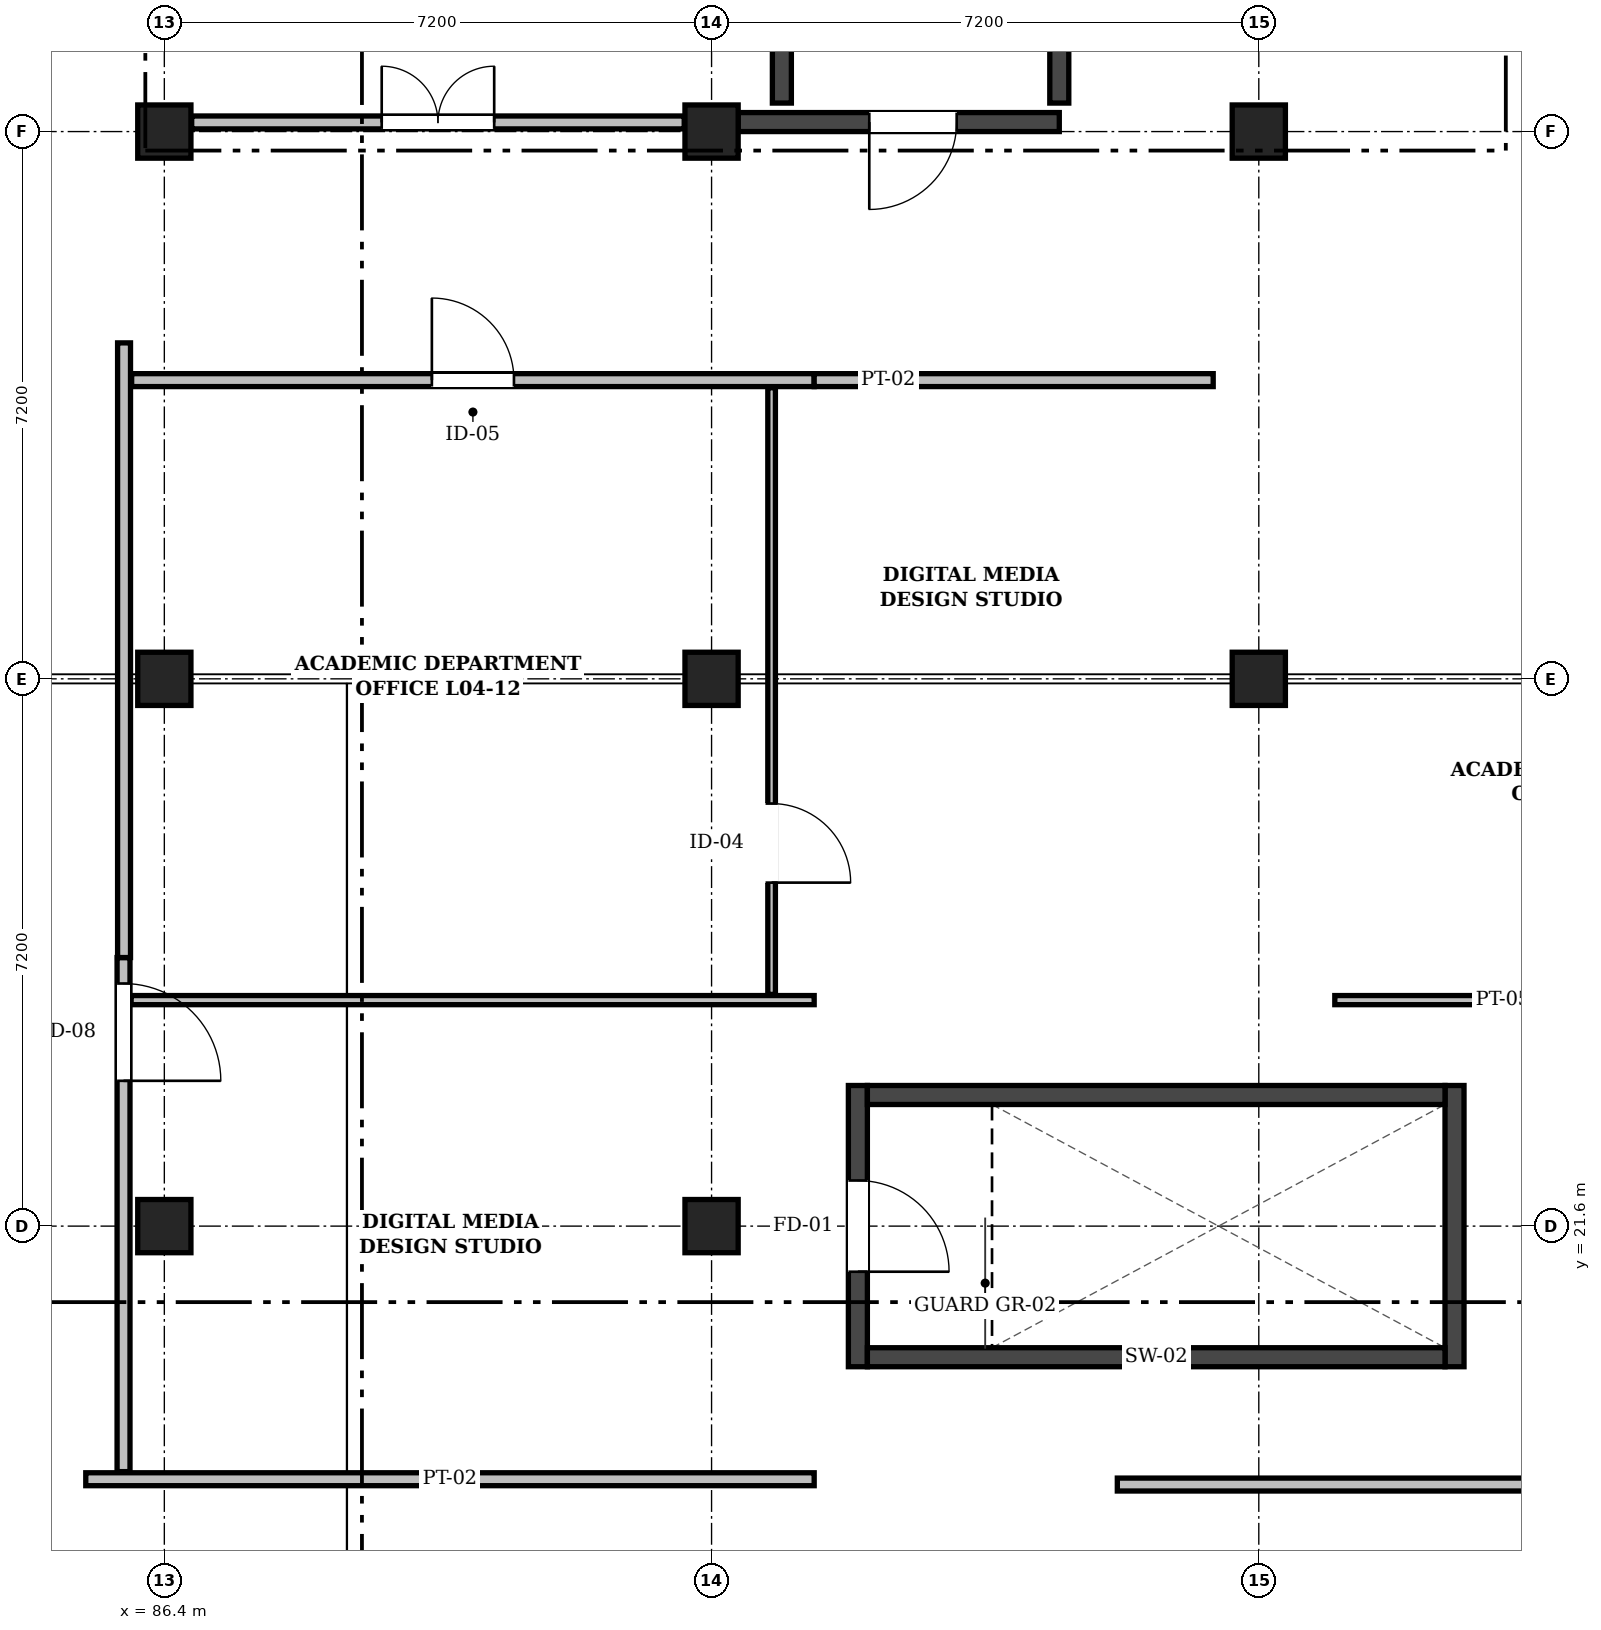
"""IFC4 building model, lengths in metres.
Left out: names, types, materials, properties, quantities, classifications, styles, units other than length and angle.
Written with IfcOpenShell. Run it as: python <this file> out.ifc"""

import sys

from ifc_helpers import new_model, si_unit, direction, frame, frame_2d, origin, origin_2d, place, context, subcontext, project, spatial, rectangle, extrude, element, fill, save


model = new_model("IFC4")
c1 = context("Model", 3, precision=1e-05, world=origin(), true_north=direction((0.0, 1.0)))
c2 = subcontext(c1, "Body", "Model", "MODEL_VIEW")
j1 = project(units=[si_unit("LENGTHUNIT", "METRE"), si_unit("PLANEANGLEUNIT", "RADIAN")], contexts=[c1])
p1 = place(None, origin())
s1 = spatial("IfcSite", under=j1, at=p1, CompositionType="ELEMENT")
p2 = place(p1, origin())
s2 = spatial("IfcBuilding", under=s1, at=p2, CompositionType="ELEMENT")
p3 = place(p2, frame((0.0, 0.0, 18.9)))
s3 = spatial("IfcBuildingStorey", under=s2, at=p3, CompositionType="ELEMENT", Elevation=18.9)
for number, where, z_axis, x_axis in (
    (1, (86.4, 21.6, 0.0), (0.0, 0.0, 1.0), (1.0, 0.0, 0.0)),
    (2, (86.4, 28.8, 0.0), (0.0, 0.0, 1.0), (1.0, 0.0, 0.0)),
    (3, (86.4, 36.0, 0.0), (0.0, 0.0, 1.0), (1.0, 0.0, 0.0)),
    (4, (93.6, 21.6, 0.0), (0.0, 0.0, 1.0), (1.0, 0.0, 0.0)),
    (5, (93.6, 28.8, 0.0), (0.0, 0.0, 1.0), (1.0, 0.0, 0.0)),
    (6, (93.6, 36.0, 0.0), (0.0, 0.0, 1.0), (1.0, 0.0, 0.0)),
    (7, (100.8, 28.8, 0.0), (0.0, 0.0, 1.0), (1.0, 0.0, 0.0)),
    (8, (100.8, 36.0, 0.0), (0.0, 0.0, 1.0), (1.0, 0.0, 0.0)),
):
    element("IfcColumn", number, at=place(p3, frame(where, z_axis=z_axis, x_axis=x_axis)), inside=s3, PredefinedType="COLUMN", context=c2, shape_type="SweptSolid", body=[
        extrude(rectangle(XDim=0.7, YDim=0.7, at=origin_2d()), origin(), (0.0, 0.0, 1.0), 4.5),
    ])
p4 = place(p3, frame((95.525, 19.75, 0.0), z_axis=(0.0, 0.0, 1.0), x_axis=(0.0, 1.0, 0.0)))
e9 = element("IfcWall", 9, at=p4, inside=s3, PredefinedType="SHEAR", context=c2, shape_type="SweptSolid", body=[
    extrude(rectangle(XDim=3.7, YDim=0.25, at=frame_2d((1.85, 0.0))), origin(), (0.0, 0.0, 1.0), 4.25),
])
p5 = place(p4, frame((1.25, 0.0, 0.0)))
e10 = element("IfcOpeningElement", 10, at=p5, cuts=e9, PredefinedType="OPENING", context=c2, shape_type="SweptSolid", body=[
    extrude(rectangle(XDim=1.2, YDim=2.15, at=frame_2d((0.6, 1.075))), frame((0.0, 0.137, 0.0), z_axis=(0.0, -1.0, 0.0), x_axis=(1.0, 0.0, 0.0)), (0.0, 0.0, 1.0), 0.274),
])
p6 = place(p3, frame((103.375, 19.75, 0.0), z_axis=(0.0, 0.0, 1.0), x_axis=(0.0, 1.0, 0.0)))
e11 = element("IfcWall", 11, at=p6, inside=s3, PredefinedType="SHEAR", context=c2, shape_type="SweptSolid", body=[
    extrude(rectangle(XDim=3.7, YDim=0.25, at=frame_2d((1.85, 0.0))), origin(), (0.0, 0.0, 1.0), 4.25),
])
for number, where, z_axis, x_axis in (
    (12, (95.65, 19.875, 0.0), (0.0, 0.0, 1.0), (1.0, 0.0, 0.0)),
    (13, (95.65, 23.325, 0.0), (0.0, 0.0, 1.0), (1.0, 0.0, 0.0)),
):
    element("IfcWall", number, at=place(p3, frame(where, z_axis=z_axis, x_axis=x_axis)), inside=s3, PredefinedType="SHEAR", context=c2, shape_type="SweptSolid", body=[
        extrude(rectangle(XDim=7.6, YDim=0.25, at=frame_2d((3.8, 0.0))), origin(), (0.0, 0.0, 1.0), 4.25),
    ])
p7 = place(p3, frame((93.95, 36.125, 0.0), z_axis=(0.0, 0.0, 1.0), x_axis=(1.0, 0.0, 0.0)))
e14 = element("IfcWall", 14, at=p7, inside=s3, PredefinedType="SHEAR", context=c2, shape_type="SweptSolid", body=[
    extrude(rectangle(XDim=4.225, YDim=0.25, at=frame_2d((2.113, 0.0))), origin(), (0.0, 0.0, 1.0), 4.25),
])
p8 = place(p7, frame((1.725, 0.0, 0.0)))
e15 = element("IfcOpeningElement", 15, at=p8, cuts=e14, PredefinedType="OPENING", context=c2, shape_type="SweptSolid", body=[
    extrude(rectangle(XDim=1.15, YDim=2.15, at=frame_2d((0.575, 1.075))), frame((0.0, 0.137, 0.0), z_axis=(0.0, -1.0, 0.0), x_axis=(1.0, 0.0, 0.0)), (0.0, 0.0, 1.0), 0.274),
])
p9 = place(p3, frame((94.525, 36.375, 0.0), z_axis=(0.0, 0.0, 1.0), x_axis=(0.0, 1.0, 0.0)))
e16 = element("IfcWall", 16, at=p9, inside=s3, PredefinedType="SHEAR", context=c2, shape_type="SweptSolid", body=[
    extrude(rectangle(XDim=2.77, YDim=0.25, at=frame_2d((1.385, 0.0))), origin(), (0.0, 0.0, 1.0), 4.25),
])
p10 = place(p3, frame((98.175, 36.375, 0.0), z_axis=(0.0, 0.0, 1.0), x_axis=(0.0, 1.0, 0.0)))
e17 = element("IfcWall", 17, at=p10, inside=s3, PredefinedType="SHEAR", context=c2, shape_type="SweptSolid", body=[
    extrude(rectangle(XDim=3.225, YDim=0.25, at=frame_2d((1.613, 0.0))), origin(), (0.0, 0.0, 1.0), 4.25),
])
p11 = place(p3, frame((85.366, 18.27, 0.0), z_axis=(0.0, 0.0, 1.0), x_axis=(1.0, 0.0, 0.0)))
e18 = element("IfcWall", 18, at=p11, inside=s3, PredefinedType="PARTITIONING", context=c2, shape_type="SweptSolid", body=[
    extrude(rectangle(XDim=9.583, YDim=0.17, at=frame_2d((4.792, 0.0))), origin(), (0.0, 0.0, 1.0), 4.16),
])
p12 = place(p3, frame((98.938, 18.2, 0.0), z_axis=(0.0, 0.0, 1.0), x_axis=(1.0, 0.0, 0.0)))
e19 = element("IfcWall", 19, at=p12, inside=s3, PredefinedType="PARTITIONING", context=c2, shape_type="SweptSolid", body=[
    extrude(rectangle(XDim=12.51, YDim=0.17, at=frame_2d((6.255, 0.0))), origin(), (0.0, 0.0, 1.0), 4.16),
])
p13 = place(p3, frame((85.863, 18.37, 0.0), z_axis=(0.0, 0.0, 1.0), x_axis=(0.0, 1.0, 0.0)))
e20 = element("IfcWall", 20, at=p13, inside=s3, PredefinedType="PARTITIONING", context=c2, shape_type="SweptSolid", body=[
    extrude(rectangle(XDim=6.763, YDim=0.17, at=frame_2d((3.382, 0.0))), origin(), (0.0, 0.0, 1.0), 4.16),
])
p14 = place(p13, frame((5.142, 0.0, 0.0)))
e21 = element("IfcOpeningElement", 21, at=p14, cuts=e20, PredefinedType="OPENING", context=c2, shape_type="SweptSolid", body=[
    extrude(rectangle(XDim=1.28, YDim=2.22, at=frame_2d((0.64, 1.11))), frame((0.0, 0.097, 0.0), z_axis=(0.0, -1.0, 0.0), x_axis=(1.0, 0.0, 0.0)), (0.0, 0.0, 1.0), 0.194),
])
p15 = place(p3, frame((85.87, 25.133, 0.0), z_axis=(0.0, 0.0, 1.0), x_axis=(0.0, 1.0, 0.0)))
e22 = element("IfcWall", 22, at=p15, inside=s3, PredefinedType="PARTITIONING", context=c2, shape_type="SweptSolid", body=[
    extrude(rectangle(XDim=8.087, YDim=0.17, at=frame_2d((4.043, 0.0))), origin(), (0.0, 0.0, 1.0), 4.16),
])
p16 = place(p3, frame((86.76, 36.12, 0.0), z_axis=(0.0, 0.0, 1.0), x_axis=(1.0, 0.0, 0.0)))
e23 = element("IfcWall", 23, at=p16, inside=s3, PredefinedType="PARTITIONING", context=c2, shape_type="SweptSolid", body=[
    extrude(rectangle(XDim=6.48, YDim=0.17, at=frame_2d((3.24, 0.0))), origin(), (0.0, 0.0, 1.0), 3.73),
])
p17 = place(p16, frame((2.5, 0.0, 0.0)))
e24 = element("IfcOpeningElement", 24, at=p17, cuts=e23, PredefinedType="OPENING", context=c2, shape_type="SweptSolid", body=[
    extrude(rectangle(XDim=1.48, YDim=2.26, at=frame_2d((0.74, 1.13))), frame((0.0, 0.097, 0.0), z_axis=(0.0, -1.0, 0.0), x_axis=(1.0, 0.0, 0.0)), (0.0, 0.0, 1.0), 0.194),
])
p18 = place(p3, frame((85.97, 32.73, 0.0), z_axis=(0.0, 0.0, 1.0), x_axis=(1.0, 0.0, 0.0)))
e25 = element("IfcWall", 25, at=p18, inside=s3, PredefinedType="PARTITIONING", context=c2, shape_type="SweptSolid", body=[
    extrude(rectangle(XDim=8.98, YDim=0.17, at=frame_2d((4.49, 0.0))), origin(), (0.0, 0.0, 1.0), 4.16),
])
p19 = place(p18, frame((3.95, 0.0, 0.0)))
e26 = element("IfcOpeningElement", 26, at=p19, cuts=e25, PredefinedType="OPENING", context=c2, shape_type="SweptSolid", body=[
    extrude(rectangle(XDim=1.08, YDim=2.2, at=frame_2d((0.54, 1.1))), frame((0.0, 0.097, 0.0), z_axis=(0.0, -1.0, 0.0), x_axis=(1.0, 0.0, 0.0)), (0.0, 0.0, 1.0), 0.194),
])
p20 = place(p3, frame((94.95, 32.73, 0.0), z_axis=(0.0, 0.0, 1.0), x_axis=(1.0, 0.0, 0.0)))
e27 = element("IfcWall", 27, at=p20, inside=s3, PredefinedType="PARTITIONING", context=c2, shape_type="SweptSolid", body=[
    extrude(rectangle(XDim=5.25, YDim=0.17, at=frame_2d((2.625, 0.0))), origin(), (0.0, 0.0, 1.0), 4.16),
])
p21 = place(p3, frame((85.963, 24.573, 0.0), z_axis=(0.0, 0.0, 1.0), x_axis=(1.0, 0.0, 0.0)))
e28 = element("IfcWall", 28, at=p21, inside=s3, PredefinedType="PARTITIONING", context=c2, shape_type="SweptSolid", body=[
    extrude(rectangle(XDim=8.987, YDim=0.12, at=frame_2d((4.493, 0.0))), origin(), (0.0, 0.0, 1.0), 4.16),
])
p22 = place(p3, frame((94.39, 24.648, 0.0), z_axis=(0.0, 0.0, 1.0), x_axis=(0.0, 1.0, 0.0)))
e29 = element("IfcWall", 29, at=p22, inside=s3, PredefinedType="PARTITIONING", context=c2, shape_type="SweptSolid", body=[
    extrude(rectangle(XDim=7.982, YDim=0.1, at=frame_2d((3.991, 0.0))), origin(), (0.0, 0.0, 1.0), 4.16),
])
p23 = place(p22, frame((1.471, 0.0, 0.0)))
e30 = element("IfcOpeningElement", 30, at=p23, cuts=e29, PredefinedType="OPENING", context=c2, shape_type="SweptSolid", body=[
    extrude(rectangle(XDim=1.04, YDim=2.18, at=frame_2d((0.52, 1.09))), frame((0.0, 0.062, 0.0), z_axis=(0.0, -1.0, 0.0), x_axis=(1.0, 0.0, 0.0)), (0.0, 0.0, 1.0), 0.124),
])
p24 = place(p3, frame((101.8, 24.573, 0.0), z_axis=(0.0, 0.0, 1.0), x_axis=(1.0, 0.0, 0.0)))
e31 = element("IfcWall", 31, at=p24, inside=s3, PredefinedType="PARTITIONING", context=c2, shape_type="SweptSolid", body=[
    extrude(rectangle(XDim=9.678, YDim=0.12, at=frame_2d((4.839, 0.0))), origin(), (0.0, 0.0, 1.0), 4.16),
])
p25 = place(p24, frame((5.075, 0.0, 0.0)))
e32 = element("IfcOpeningElement", 32, at=p25, cuts=e31, PredefinedType="OPENING", context=c2, shape_type="SweptSolid", body=[
    extrude(rectangle(XDim=2.16, YDim=2.35, at=frame_2d((1.08, 1.175))), frame((0.0, 0.072, 0.0), z_axis=(0.0, -1.0, 0.0), x_axis=(1.0, 0.0, 0.0)), (0.0, 0.0, 1.0), 0.144),
])
p26 = place(p5, frame((1.2, 0.0, 0.0), z_axis=(0.0, 0.0, 1.0), x_axis=(-1.0, 0.0, 0.0)))
e33 = element("IfcDoor", 33, at=p26, inside=s3, OperationType="SINGLE_SWING_RIGHT", PredefinedType="DOOR", context=c2, shape_type="SweptSolid", body=[
    extrude(rectangle(XDim=1.2, YDim=2.15, at=frame_2d((0.6, 1.075))), frame((0.0, 0.025, 0.0), z_axis=(0.0, -1.0, 0.0), x_axis=(1.0, 0.0, 0.0)), (0.0, 0.0, 1.0), 0.05),
])
fill(e10, e33)
p27 = place(p8, frame((1.15, 0.0, 0.0), z_axis=(0.0, 0.0, 1.0), x_axis=(-1.0, 0.0, 0.0)))
e34 = element("IfcDoor", 34, at=p27, inside=s3, OperationType="SINGLE_SWING_RIGHT", PredefinedType="DOOR", context=c2, shape_type="SweptSolid", body=[
    extrude(rectangle(XDim=1.15, YDim=2.15, at=frame_2d((0.575, 1.075))), frame((0.0, 0.025, 0.0), z_axis=(0.0, -1.0, 0.0), x_axis=(1.0, 0.0, 0.0)), (0.0, 0.0, 1.0), 0.05),
])
fill(e15, e34)
p28 = place(p19, origin())
e35 = element("IfcDoor", 35, at=p28, inside=s3, OperationType="SINGLE_SWING_LEFT", PredefinedType="DOOR", context=c2, shape_type="SweptSolid", body=[
    extrude(rectangle(XDim=1.08, YDim=2.2, at=frame_2d((0.54, 1.1))), frame((0.0, 0.025, 0.0), z_axis=(0.0, -1.0, 0.0), x_axis=(1.0, 0.0, 0.0)), (0.0, 0.0, 1.0), 0.05),
])
fill(e26, e35)
p29 = place(p14, frame((1.28, 0.0, 0.0), z_axis=(0.0, 0.0, 1.0), x_axis=(-1.0, 0.0, 0.0)))
e36 = element("IfcDoor", 36, at=p29, inside=s3, OperationType="SINGLE_SWING_RIGHT", PredefinedType="DOOR", context=c2, shape_type="SweptSolid", body=[
    extrude(rectangle(XDim=1.28, YDim=2.22, at=frame_2d((0.64, 1.11))), frame((0.0, 0.025, 0.0), z_axis=(0.0, -1.0, 0.0), x_axis=(1.0, 0.0, 0.0)), (0.0, 0.0, 1.0), 0.05),
])
fill(e21, e36)
p30 = place(p17, origin())
e37 = element("IfcDoor", 37, at=p30, inside=s3, OperationType="DOUBLE_DOOR_SINGLE_SWING", PredefinedType="DOOR", context=c2, shape_type="SweptSolid", body=[
    extrude(rectangle(XDim=1.48, YDim=2.26, at=frame_2d((0.74, 1.13))), frame((0.0, 0.025, 0.0), z_axis=(0.0, -1.0, 0.0), x_axis=(1.0, 0.0, 0.0)), (0.0, 0.0, 1.0), 0.05),
])
fill(e24, e37)
p31 = place(p23, frame((1.04, 0.0, 0.0), z_axis=(0.0, 0.0, 1.0), x_axis=(-1.0, 0.0, 0.0)))
e38 = element("IfcDoor", 38, at=p31, inside=s3, OperationType="SINGLE_SWING_RIGHT", PredefinedType="DOOR", context=c2, shape_type="SweptSolid", body=[
    extrude(rectangle(XDim=1.04, YDim=2.18, at=frame_2d((0.52, 1.09))), frame((0.0, 0.025, 0.0), z_axis=(0.0, -1.0, 0.0), x_axis=(1.0, 0.0, 0.0)), (0.0, 0.0, 1.0), 0.05),
])
fill(e30, e38)
save(model, sys.argv[1])
